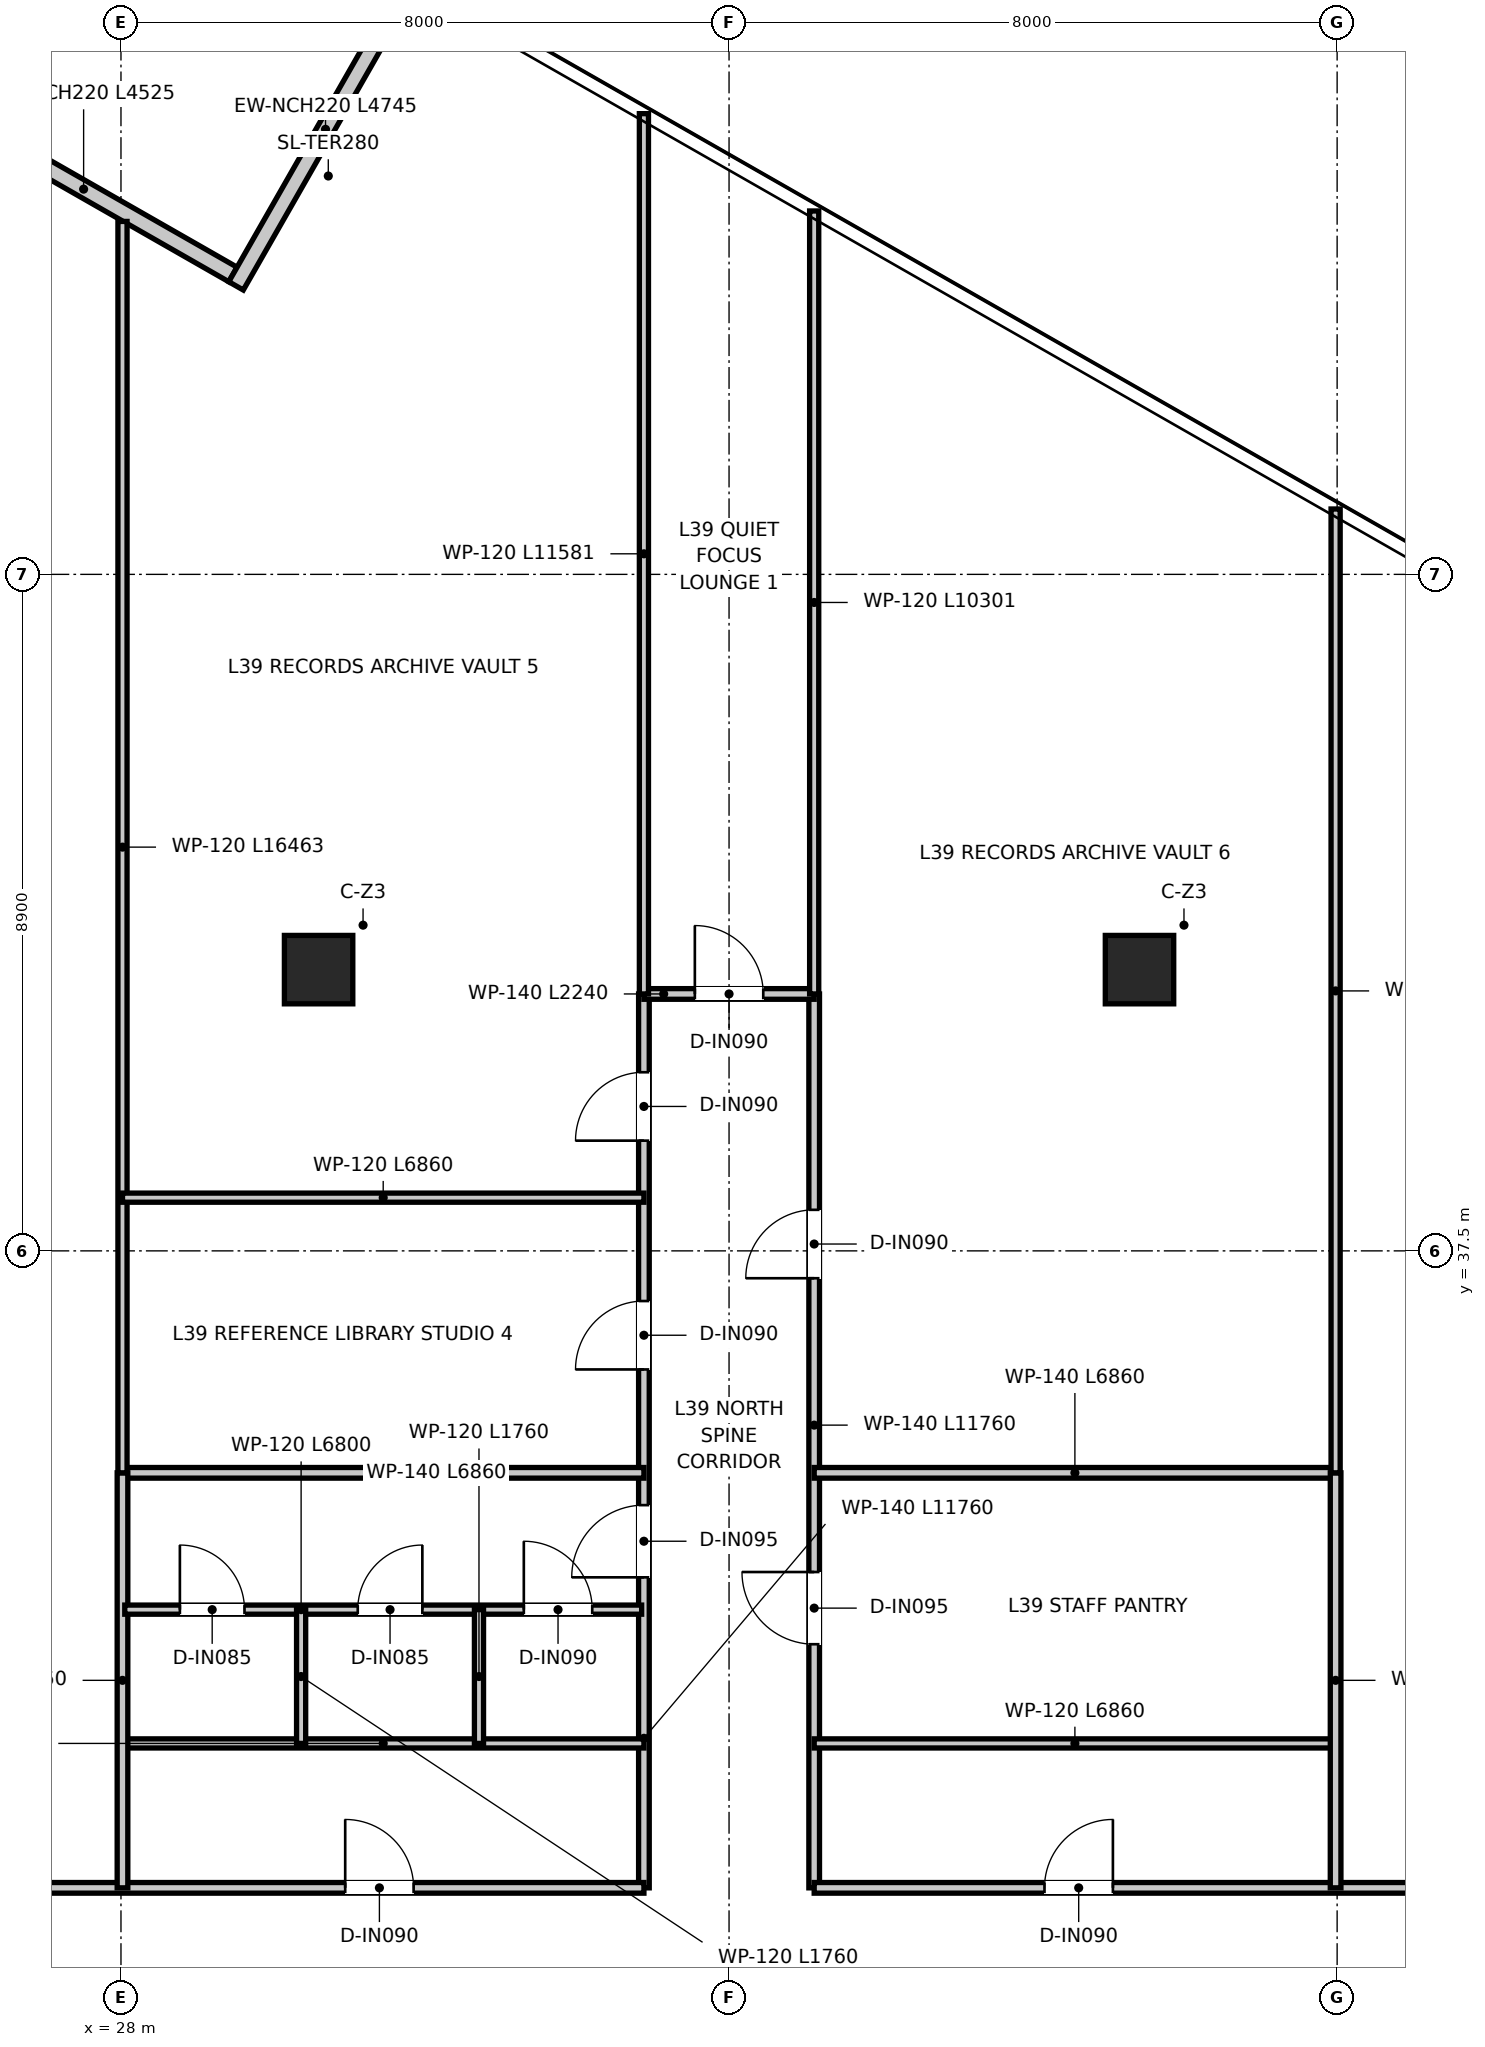
"""IFC4 building model, lengths in metres.
Left out: names, types, materials, properties, quantities, classifications, styles, units other than length and angle.
Written with IfcOpenShell. Run it as: python <this file> out.ifc"""

import sys

from ifc_helpers import new_model, si_unit, direction, frame, frame_2d, origin, origin_2d, place, context, subcontext, project, spatial, rectangle, extrude, source, transform, mapped, element, fill, save


model = new_model("IFC4")
c1 = context("Model", 3, precision=1e-05, world=origin(), true_north=direction((0.0, 1.0)))
c2 = subcontext(c1, "Body", "Model", "MODEL_VIEW")
j1 = project(units=[si_unit("LENGTHUNIT", "METRE"), si_unit("PLANEANGLEUNIT", "RADIAN")], contexts=[c1])
p1 = place(None, origin())
s1 = spatial("IfcSite", under=j1, at=p1, CompositionType="ELEMENT")
p2 = place(p1, origin())
s2 = spatial("IfcBuilding", under=s1, at=p2, CompositionType="ELEMENT")
p3 = place(p2, frame((0.0, 0.0, 162.0)))
s3 = spatial("IfcBuildingStorey", under=s2, at=p3, CompositionType="ELEMENT", Elevation=162.0)
m1 = source(origin(), c2, "Body", "SweptSolid", [
    extrude(rectangle(XDim=0.9, YDim=0.9, at=origin_2d()), origin(), (0.0, 0.0, 1.0), 3.95),
])
for number, where, z_axis, x_axis in (
    (1, (30.6, 41.2, 0.0), (0.0, 0.0, 1.0), (1.0, 0.0, 0.0)),
    (2, (41.4, 41.2, 0.0), (0.0, 0.0, 1.0), (1.0, 0.0, 0.0)),
):
    element("IfcColumn", number, at=place(p3, frame(where, z_axis=z_axis, x_axis=x_axis)), inside=s3, PredefinedType="COLUMN", context=c2, shape_type="MappedRepresentation", body=[
        mapped(m1, transform((0.0, 0.0, 0.0), x_axis=(1.0, 0.0, 0.0), y_axis=(0.0, 1.0, 0.0), z_axis=(0.0, 0.0, 1.0), scale=1.0)),
    ])
p4 = place(p3, frame((29.473, 50.345, 0.0), z_axis=(0.0, 0.0, 1.0), x_axis=(-0.868170087613, 0.496266761908, 0.0)))
e3 = element("IfcWall", 3, at=p4, inside=s3, PredefinedType="ELEMENTEDWALL", context=c2, shape_type="SweptSolid", body=[
    extrude(rectangle(XDim=4.525, YDim=0.22, at=frame_2d((2.262, 0.0))), origin(), (0.0, 0.0, 1.0), 3.67),
])
p5 = place(p3, frame((31.868, 54.315, 0.0), z_axis=(0.0, 0.0, 1.0), x_axis=(-0.496205429031, -0.868205144076, 0.0)))
e4 = element("IfcWall", 4, at=p5, inside=s3, PredefinedType="ELEMENTEDWALL", context=c2, shape_type="SweptSolid", body=[
    extrude(rectangle(XDim=4.745, YDim=0.22, at=frame_2d((2.373, 0.0))), origin(), (0.0, 0.0, 1.0), 3.67),
])
p6 = place(p3, frame((34.88, 29.12, 0.0), z_axis=(0.0, 0.0, 1.0), x_axis=(0.0, 1.0, 0.0)))
e5 = element("IfcWall", 5, at=p6, inside=s3, PredefinedType="PARTITIONING", context=c2, shape_type="SweptSolid", body=[
    extrude(rectangle(XDim=11.76, YDim=0.14, at=frame_2d((5.88, 0.0))), origin(), (0.0, 0.0, 1.0), 3.03),
])
p7 = place(p6, frame((4.085, 0.0, 0.0)))
e6 = element("IfcOpeningElement", 6, at=p7, cuts=e5, PredefinedType="OPENING", context=c2, shape_type="SweptSolid", body=[
    extrude(rectangle(XDim=0.95, YDim=2.1, at=frame_2d((0.475, 1.05))), frame((0.0, 0.08, 0.0), z_axis=(0.0, -1.0, 0.0), x_axis=(1.0, 0.0, 0.0)), (0.0, 0.0, 1.0), 0.16),
])
p8 = place(p6, frame((6.82, 0.0, 0.0)))
e7 = element("IfcOpeningElement", 7, at=p8, cuts=e5, PredefinedType="OPENING", context=c2, shape_type="SweptSolid", body=[
    extrude(rectangle(XDim=0.9, YDim=2.1, at=frame_2d((0.45, 1.05))), frame((0.0, 0.08, 0.0), z_axis=(0.0, -1.0, 0.0), x_axis=(1.0, 0.0, 0.0)), (0.0, 0.0, 1.0), 0.16),
])
p9 = place(p6, frame((9.83, 0.0, 0.0)))
e8 = element("IfcOpeningElement", 8, at=p9, cuts=e5, PredefinedType="OPENING", context=c2, shape_type="SweptSolid", body=[
    extrude(rectangle(XDim=0.9, YDim=2.1, at=frame_2d((0.45, 1.05))), frame((0.0, 0.08, 0.0), z_axis=(0.0, -1.0, 0.0), x_axis=(1.0, 0.0, 0.0)), (0.0, 0.0, 1.0), 0.16),
])
p10 = place(p3, frame((37.12, 29.12, 0.0), z_axis=(0.0, 0.0, 1.0), x_axis=(0.0, 1.0, 0.0)))
e9 = element("IfcWall", 9, at=p10, inside=s3, PredefinedType="PARTITIONING", context=c2, shape_type="SweptSolid", body=[
    extrude(rectangle(XDim=11.76, YDim=0.14, at=frame_2d((5.88, 0.0))), origin(), (0.0, 0.0, 1.0), 3.03),
])
p11 = place(p10, frame((3.205, 0.0, 0.0)))
e10 = element("IfcOpeningElement", 10, at=p11, cuts=e9, PredefinedType="OPENING", context=c2, shape_type="SweptSolid", body=[
    extrude(rectangle(XDim=0.95, YDim=2.1, at=frame_2d((0.475, 1.05))), frame((0.0, 0.08, 0.0), z_axis=(0.0, -1.0, 0.0), x_axis=(1.0, 0.0, 0.0)), (0.0, 0.0, 1.0), 0.16),
])
p12 = place(p10, frame((8.02, 0.0, 0.0)))
e11 = element("IfcOpeningElement", 11, at=p12, cuts=e9, PredefinedType="OPENING", context=c2, shape_type="SweptSolid", body=[
    extrude(rectangle(XDim=0.9, YDim=2.1, at=frame_2d((0.45, 1.05))), frame((0.0, 0.08, 0.0), z_axis=(0.0, -1.0, 0.0), x_axis=(1.0, 0.0, 0.0)), (0.0, 0.0, 1.0), 0.16),
])
p13 = place(p3, frame((34.88, 40.88, 0.0), z_axis=(0.0, 0.0, 1.0), x_axis=(1.0, 0.0, 0.0)))
e12 = element("IfcWall", 12, at=p13, inside=s3, PredefinedType="PARTITIONING", context=c2, shape_type="SweptSolid", body=[
    extrude(rectangle(XDim=2.24, YDim=0.14, at=frame_2d((1.12, 0.0))), origin(), (0.0, 0.0, 1.0), 3.67),
])
p14 = place(p13, frame((0.67, 0.0, 0.0)))
e13 = element("IfcOpeningElement", 13, at=p14, cuts=e12, PredefinedType="OPENING", context=c2, shape_type="SweptSolid", body=[
    extrude(rectangle(XDim=0.9, YDim=2.1, at=frame_2d((0.45, 1.05))), frame((0.0, 0.08, 0.0), z_axis=(0.0, -1.0, 0.0), x_axis=(1.0, 0.0, 0.0)), (0.0, 0.0, 1.0), 0.16),
])
p15 = place(p3, frame((12.262, 29.12, 0.0), z_axis=(0.0, 0.0, 1.0), x_axis=(1.0, 0.0, 0.0)))
e14 = element("IfcWall", 14, at=p15, inside=s3, PredefinedType="PARTITIONING", context=c2, shape_type="SweptSolid", body=[
    extrude(rectangle(XDim=22.618, YDim=0.14, at=frame_2d((11.309, 0.0))), origin(), (0.0, 0.0, 1.0), 3.03),
])
p16 = place(p15, frame((18.688, 0.0, 0.0)))
e15 = element("IfcOpeningElement", 15, at=p16, cuts=e14, PredefinedType="OPENING", context=c2, shape_type="SweptSolid", body=[
    extrude(rectangle(XDim=0.9, YDim=2.1, at=frame_2d((0.45, 1.05))), frame((0.0, 0.08, 0.0), z_axis=(0.0, -1.0, 0.0), x_axis=(1.0, 0.0, 0.0)), (0.0, 0.0, 1.0), 0.16),
])
p17 = place(p15, frame((3.514, 0.0, 0.0)))
e16 = element("IfcOpeningElement", 16, at=p17, cuts=e14, PredefinedType="OPENING", context=c2, shape_type="SweptSolid", body=[
    extrude(rectangle(XDim=0.9, YDim=2.1, at=frame_2d((0.45, 1.05))), frame((0.0, 0.08, 0.0), z_axis=(0.0, -1.0, 0.0), x_axis=(1.0, 0.0, 0.0)), (0.0, 0.0, 1.0), 0.16),
])
p18 = place(p15, frame((12.588, 0.0, 0.0)))
e17 = element("IfcOpeningElement", 17, at=p18, cuts=e14, PredefinedType="OPENING", context=c2, shape_type="SweptSolid", body=[
    extrude(rectangle(XDim=0.9, YDim=2.1, at=frame_2d((0.45, 1.05))), frame((0.0, 0.08, 0.0), z_axis=(0.0, -1.0, 0.0), x_axis=(1.0, 0.0, 0.0)), (0.0, 0.0, 1.0), 0.16),
])
p19 = place(p3, frame((37.12, 29.12, 0.0), z_axis=(0.0, 0.0, 1.0), x_axis=(1.0, 0.0, 0.0)))
e18 = element("IfcWall", 18, at=p19, inside=s3, PredefinedType="PARTITIONING", context=c2, shape_type="SweptSolid", body=[
    extrude(rectangle(XDim=25.384, YDim=0.14, at=frame_2d((12.692, 0.0))), origin(), (0.0, 0.0, 1.0), 3.03),
])
p20 = place(p19, frame((3.03, 0.0, 0.0)))
e19 = element("IfcOpeningElement", 19, at=p20, cuts=e18, PredefinedType="OPENING", context=c2, shape_type="SweptSolid", body=[
    extrude(rectangle(XDim=0.9, YDim=2.1, at=frame_2d((0.45, 1.05))), frame((0.0, 0.08, 0.0), z_axis=(0.0, -1.0, 0.0), x_axis=(1.0, 0.0, 0.0)), (0.0, 0.0, 1.0), 0.16),
])
p21 = place(p19, frame((8.42, 0.0, 0.0)))
e20 = element("IfcOpeningElement", 20, at=p21, cuts=e18, PredefinedType="OPENING", context=c2, shape_type="SweptSolid", body=[
    extrude(rectangle(XDim=0.9, YDim=2.1, at=frame_2d((0.45, 1.05))), frame((0.0, 0.08, 0.0), z_axis=(0.0, -1.0, 0.0), x_axis=(1.0, 0.0, 0.0)), (0.0, 0.0, 1.0), 0.16),
])
p22 = place(p19, frame((11.93, 0.0, 0.0)))
e21 = element("IfcOpeningElement", 21, at=p22, cuts=e18, PredefinedType="OPENING", context=c2, shape_type="SweptSolid", body=[
    extrude(rectangle(XDim=0.9, YDim=2.1, at=frame_2d((0.45, 1.05))), frame((0.0, 0.08, 0.0), z_axis=(0.0, -1.0, 0.0), x_axis=(1.0, 0.0, 0.0)), (0.0, 0.0, 1.0), 0.16),
])
p23 = place(p19, frame((19.204, 0.0, 0.0)))
e22 = element("IfcOpeningElement", 22, at=p23, cuts=e18, PredefinedType="OPENING", context=c2, shape_type="SweptSolid", body=[
    extrude(rectangle(XDim=0.9, YDim=2.1, at=frame_2d((0.45, 1.05))), frame((0.0, 0.08, 0.0), z_axis=(0.0, -1.0, 0.0), x_axis=(1.0, 0.0, 0.0)), (0.0, 0.0, 1.0), 0.16),
])
for number, where, z_axis, x_axis in (
    (23, (28.02, 31.02, 0.0), (0.0, 0.0, 1.0), (1.0, 0.0, 0.0)),
    (24, (37.12, 31.02, 0.0), (0.0, 0.0, 1.0), (1.0, 0.0, 0.0)),
):
    element("IfcWall", number, at=place(p3, frame(where, z_axis=z_axis, x_axis=x_axis)), inside=s3, PredefinedType="PARTITIONING", context=c2, shape_type="SweptSolid", body=[
        extrude(rectangle(XDim=6.86, YDim=0.12, at=frame_2d((3.43, 0.0))), origin(), (0.0, 0.0, 1.0), 3.08),
    ])
for number, where, z_axis, x_axis in (
    (25, (28.02, 34.58, 0.0), (0.0, 0.0, 1.0), (1.0, 0.0, 0.0)),
    (26, (37.12, 34.58, 0.0), (0.0, 0.0, 1.0), (1.0, 0.0, 0.0)),
):
    element("IfcWall", number, at=place(p3, frame(where, z_axis=z_axis, x_axis=x_axis)), inside=s3, PredefinedType="PARTITIONING", context=c2, shape_type="SweptSolid", body=[
        extrude(rectangle(XDim=6.86, YDim=0.14, at=frame_2d((3.43, 0.0))), origin(), (0.0, 0.0, 1.0), 3.08),
    ])
for number, where, z_axis, x_axis in (
    (27, (28.02, 29.12, 0.0), (0.0, 0.0, 1.0), (0.0, 1.0, 0.0)),
    (28, (43.98, 29.12, 0.0), (0.0, 0.0, 1.0), (0.0, 1.0, 0.0)),
):
    element("IfcWall", number, at=place(p3, frame(where, z_axis=z_axis, x_axis=x_axis)), inside=s3, PredefinedType="PARTITIONING", context=c2, shape_type="SweptSolid", body=[
        extrude(rectangle(XDim=5.46, YDim=0.14, at=frame_2d((2.73, 0.0))), origin(), (0.0, 0.0, 1.0), 3.31),
    ])
p24 = place(p3, frame((28.05, 32.78, 0.0), z_axis=(0.0, 0.0, 1.0), x_axis=(1.0, 0.0, 0.0)))
e29 = element("IfcWall", 29, at=p24, inside=s3, PredefinedType="PARTITIONING", context=c2, shape_type="SweptSolid", body=[
    extrude(rectangle(XDim=6.8, YDim=0.12, at=frame_2d((3.4, 0.0))), origin(), (0.0, 0.0, 1.0), 3.08),
])
p25 = place(p24, frame((0.725, 0.0, 0.0)))
e30 = element("IfcOpeningElement", 30, at=p25, cuts=e29, PredefinedType="OPENING", context=c2, shape_type="SweptSolid", body=[
    extrude(rectangle(XDim=0.85, YDim=2.1, at=frame_2d((0.425, 1.05))), frame((0.0, 0.07, 0.0), z_axis=(0.0, -1.0, 0.0), x_axis=(1.0, 0.0, 0.0)), (0.0, 0.0, 1.0), 0.14),
])
p26 = place(p24, frame((3.065, 0.0, 0.0)))
e31 = element("IfcOpeningElement", 31, at=p26, cuts=e29, PredefinedType="OPENING", context=c2, shape_type="SweptSolid", body=[
    extrude(rectangle(XDim=0.85, YDim=2.1, at=frame_2d((0.425, 1.05))), frame((0.0, 0.07, 0.0), z_axis=(0.0, -1.0, 0.0), x_axis=(1.0, 0.0, 0.0)), (0.0, 0.0, 1.0), 0.14),
])
p27 = place(p24, frame((5.25, 0.0, 0.0)))
e32 = element("IfcOpeningElement", 32, at=p27, cuts=e29, PredefinedType="OPENING", context=c2, shape_type="SweptSolid", body=[
    extrude(rectangle(XDim=0.9, YDim=2.1, at=frame_2d((0.45, 1.05))), frame((0.0, 0.07, 0.0), z_axis=(0.0, -1.0, 0.0), x_axis=(1.0, 0.0, 0.0)), (0.0, 0.0, 1.0), 0.14),
])
p28 = place(p3, frame((30.37, 31.02, 0.0), z_axis=(0.0, 0.0, 1.0), x_axis=(0.0, 1.0, 0.0)))
e33 = element("IfcWall", 33, at=p28, inside=s3, PredefinedType="PARTITIONING", context=c2, shape_type="SweptSolid", body=[
    extrude(rectangle(XDim=1.76, YDim=0.12, at=frame_2d((0.88, 0.0))), origin(), (0.0, 0.0, 1.0), 3.08),
])
p29 = place(p3, frame((32.71, 31.02, 0.0), z_axis=(0.0, 0.0, 1.0), x_axis=(0.0, 1.0, 0.0)))
e34 = element("IfcWall", 34, at=p29, inside=s3, PredefinedType="PARTITIONING", context=c2, shape_type="SweptSolid", body=[
    extrude(rectangle(XDim=1.76, YDim=0.12, at=frame_2d((0.88, 0.0))), origin(), (0.0, 0.0, 1.0), 3.67),
])
p30 = place(p3, frame((34.88, 40.88, 0.0), z_axis=(0.0, 0.0, 1.0), x_axis=(0.0, 1.0, 0.0)))
e35 = element("IfcWall", 35, at=p30, inside=s3, PredefinedType="PARTITIONING", context=c2, shape_type="SweptSolid", body=[
    extrude(rectangle(XDim=11.581, YDim=0.12, at=frame_2d((5.791, 0.0))), origin(), (0.0, 0.0, 1.0), 3.28),
])
p31 = place(p3, frame((37.12, 40.88, 0.0), z_axis=(0.0, 0.0, 1.0), x_axis=(0.0, 1.0, 0.0)))
e36 = element("IfcWall", 36, at=p31, inside=s3, PredefinedType="PARTITIONING", context=c2, shape_type="SweptSolid", body=[
    extrude(rectangle(XDim=10.301, YDim=0.12, at=frame_2d((5.15, 0.0))), origin(), (0.0, 0.0, 1.0), 3.28),
])
p32 = place(p3, frame((28.02, 34.58, 0.0), z_axis=(0.0, 0.0, 1.0), x_axis=(0.0, 1.0, 0.0)))
e37 = element("IfcWall", 37, at=p32, inside=s3, PredefinedType="PARTITIONING", context=c2, shape_type="SweptSolid", body=[
    extrude(rectangle(XDim=16.463, YDim=0.12, at=frame_2d((8.231, 0.0))), origin(), (0.0, 0.0, 1.0), 3.03),
])
p33 = place(p3, frame((43.98, 34.58, 0.0), z_axis=(0.0, 0.0, 1.0), x_axis=(0.0, 1.0, 0.0)))
e38 = element("IfcWall", 38, at=p33, inside=s3, PredefinedType="PARTITIONING", context=c2, shape_type="SweptSolid", body=[
    extrude(rectangle(XDim=12.68, YDim=0.12, at=frame_2d((6.34, 0.0))), origin(), (0.0, 0.0, 1.0), 3.03),
])
p34 = place(p3, frame((28.02, 38.2, 0.0), z_axis=(0.0, 0.0, 1.0), x_axis=(1.0, 0.0, 0.0)))
e39 = element("IfcWall", 39, at=p34, inside=s3, PredefinedType="PARTITIONING", context=c2, shape_type="SweptSolid", body=[
    extrude(rectangle(XDim=6.86, YDim=0.12, at=frame_2d((3.43, 0.0))), origin(), (0.0, 0.0, 1.0), 3.08),
])
p35 = place(p16, origin())
e40 = element("IfcDoor", 40, at=p35, inside=s3, OperationType="SINGLE_SWING_LEFT", PredefinedType="DOOR", context=c2, shape_type="SweptSolid", body=[
    extrude(rectangle(XDim=0.9, YDim=2.1, at=frame_2d((0.45, 1.05))), frame((0.0, 0.025, 0.0), z_axis=(0.0, -1.0, 0.0), x_axis=(1.0, 0.0, 0.0)), (0.0, 0.0, 1.0), 0.05),
])
fill(e15, e40)
p36 = place(p20, origin())
e41 = element("IfcDoor", 41, at=p36, inside=s3, OperationType="SINGLE_SWING_RIGHT", PredefinedType="DOOR", context=c2, shape_type="SweptSolid", body=[
    extrude(rectangle(XDim=0.9, YDim=2.1, at=frame_2d((0.45, 1.05))), frame((0.0, 0.025, 0.0), z_axis=(0.0, -1.0, 0.0), x_axis=(1.0, 0.0, 0.0)), (0.0, 0.0, 1.0), 0.05),
])
fill(e19, e41)
p37 = place(p7, origin())
e42 = element("IfcDoor", 42, at=p37, inside=s3, OperationType="SINGLE_SWING_LEFT", PredefinedType="DOOR", context=c2, shape_type="SweptSolid", body=[
    extrude(rectangle(XDim=0.95, YDim=2.1, at=frame_2d((0.475, 1.05))), frame((0.0, 0.025, 0.0), z_axis=(0.0, -1.0, 0.0), x_axis=(1.0, 0.0, 0.0)), (0.0, 0.0, 1.0), 0.05),
])
fill(e6, e42)
p38 = place(p11, origin())
e43 = element("IfcDoor", 43, at=p38, inside=s3, OperationType="SINGLE_SWING_RIGHT", PredefinedType="DOOR", context=c2, shape_type="SweptSolid", body=[
    extrude(rectangle(XDim=0.95, YDim=2.1, at=frame_2d((0.475, 1.05))), frame((0.0, 0.025, 0.0), z_axis=(0.0, -1.0, 0.0), x_axis=(1.0, 0.0, 0.0)), (0.0, 0.0, 1.0), 0.05),
])
fill(e10, e43)
p39 = place(p25, origin())
e44 = element("IfcDoor", 44, at=p39, inside=s3, OperationType="SINGLE_SWING_LEFT", PredefinedType="DOOR", context=c2, shape_type="SweptSolid", body=[
    extrude(rectangle(XDim=0.85, YDim=2.1, at=frame_2d((0.425, 1.05))), frame((0.0, 0.025, 0.0), z_axis=(0.0, -1.0, 0.0), x_axis=(1.0, 0.0, 0.0)), (0.0, 0.0, 1.0), 0.05),
])
fill(e30, e44)
p40 = place(p26, origin())
e45 = element("IfcDoor", 45, at=p40, inside=s3, OperationType="SINGLE_SWING_RIGHT", PredefinedType="DOOR", context=c2, shape_type="SweptSolid", body=[
    extrude(rectangle(XDim=0.85, YDim=2.1, at=frame_2d((0.425, 1.05))), frame((0.0, 0.025, 0.0), z_axis=(0.0, -1.0, 0.0), x_axis=(1.0, 0.0, 0.0)), (0.0, 0.0, 1.0), 0.05),
])
fill(e31, e45)
p41 = place(p27, origin())
e46 = element("IfcDoor", 46, at=p41, inside=s3, OperationType="SINGLE_SWING_LEFT", PredefinedType="DOOR", context=c2, shape_type="SweptSolid", body=[
    extrude(rectangle(XDim=0.9, YDim=2.1, at=frame_2d((0.45, 1.05))), frame((0.0, 0.025, 0.0), z_axis=(0.0, -1.0, 0.0), x_axis=(1.0, 0.0, 0.0)), (0.0, 0.0, 1.0), 0.05),
])
fill(e32, e46)
p42 = place(p14, origin())
e47 = element("IfcDoor", 47, at=p42, inside=s3, OperationType="SINGLE_SWING_LEFT", PredefinedType="DOOR", context=c2, shape_type="SweptSolid", body=[
    extrude(rectangle(XDim=0.9, YDim=2.1, at=frame_2d((0.45, 1.05))), frame((0.0, 0.025, 0.0), z_axis=(0.0, -1.0, 0.0), x_axis=(1.0, 0.0, 0.0)), (0.0, 0.0, 1.0), 0.05),
])
fill(e13, e47)
p43 = place(p8, origin())
e48 = element("IfcDoor", 48, at=p43, inside=s3, OperationType="SINGLE_SWING_LEFT", PredefinedType="DOOR", context=c2, shape_type="SweptSolid", body=[
    extrude(rectangle(XDim=0.9, YDim=2.1, at=frame_2d((0.45, 1.05))), frame((0.0, 0.025, 0.0), z_axis=(0.0, -1.0, 0.0), x_axis=(1.0, 0.0, 0.0)), (0.0, 0.0, 1.0), 0.05),
])
fill(e7, e48)
p44 = place(p9, origin())
e49 = element("IfcDoor", 49, at=p44, inside=s3, OperationType="SINGLE_SWING_LEFT", PredefinedType="DOOR", context=c2, shape_type="SweptSolid", body=[
    extrude(rectangle(XDim=0.9, YDim=2.1, at=frame_2d((0.45, 1.05))), frame((0.0, 0.025, 0.0), z_axis=(0.0, -1.0, 0.0), x_axis=(1.0, 0.0, 0.0)), (0.0, 0.0, 1.0), 0.05),
])
fill(e8, e49)
p45 = place(p12, origin())
e50 = element("IfcDoor", 50, at=p45, inside=s3, OperationType="SINGLE_SWING_LEFT", PredefinedType="DOOR", context=c2, shape_type="SweptSolid", body=[
    extrude(rectangle(XDim=0.9, YDim=2.1, at=frame_2d((0.45, 1.05))), frame((0.0, 0.025, 0.0), z_axis=(0.0, -1.0, 0.0), x_axis=(1.0, 0.0, 0.0)), (0.0, 0.0, 1.0), 0.05),
])
fill(e11, e50)
save(model, sys.argv[1])
